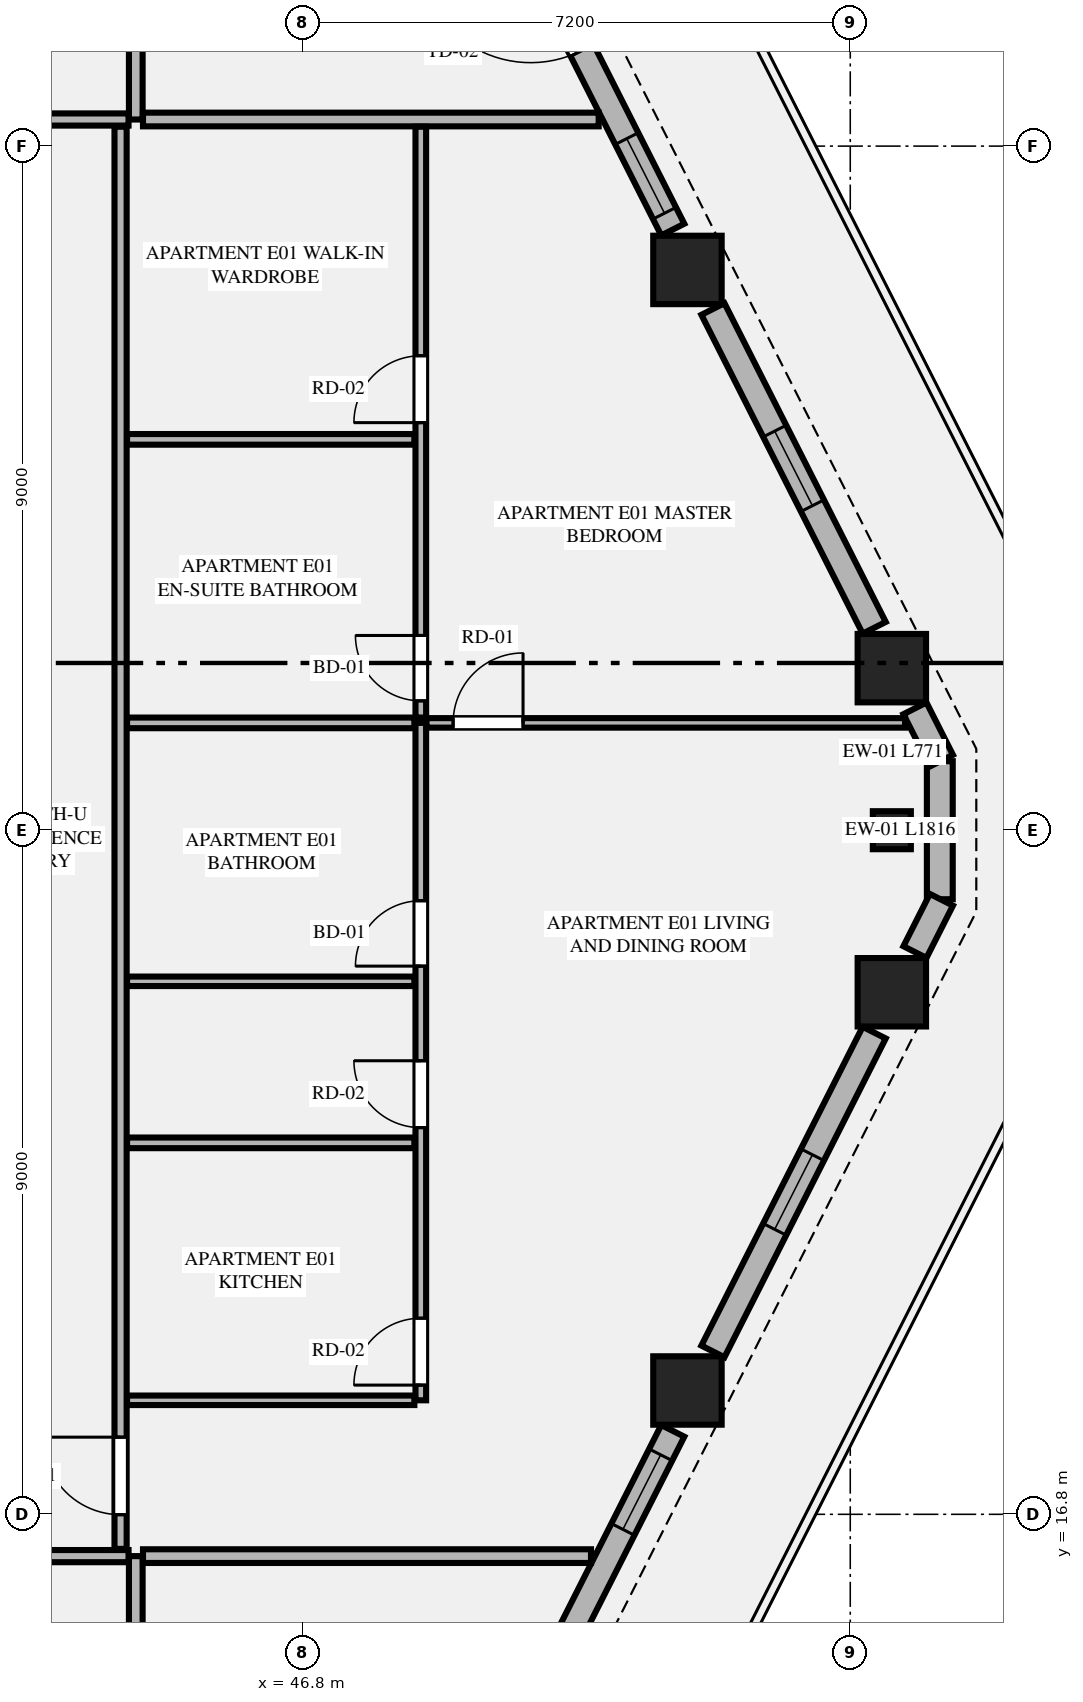
"""IFC4 building model, lengths in metres.
Left out: names, types, materials, properties, quantities, classifications, styles, units other than length and angle.
Written with IfcOpenShell. Run it as: python <this file> out.ifc"""

import sys

from ifc_helpers import new_model, si_unit, direction, frame, frame_2d, origin, origin_2d, place, context, subcontext, project, spatial, rectangle, extrude, element, fill, save


model = new_model("IFC4")
c1 = context("Model", 3, precision=1e-05, world=origin(), true_north=direction((0.0, 1.0)))
c2 = subcontext(c1, "Body", "Model", "MODEL_VIEW")
j1 = project(units=[si_unit("LENGTHUNIT", "METRE"), si_unit("PLANEANGLEUNIT", "RADIAN")], contexts=[c1])
p1 = place(None, origin())
s1 = spatial("IfcSite", under=j1, at=p1, CompositionType="ELEMENT")
p2 = place(p1, origin())
s2 = spatial("IfcBuilding", under=s1, at=p2, CompositionType="ELEMENT")
p3 = place(p2, frame((0.0, 0.0, 171.9)))
s3 = spatial("IfcBuildingStorey", under=s2, at=p3, CompositionType="ELEMENT", Elevation=171.9)
for number, where, z_axis, x_axis in (
    (1, (51.858, 18.429, 0.0), (0.0, 0.0, 1.0), (1.0, 0.0, 0.0)),
    (2, (54.547, 23.668, 0.0), (0.0, 0.0, 1.0), (1.0, 0.0, 0.0)),
    (3, (54.547, 27.932, 0.0), (0.0, 0.0, 1.0), (1.0, 0.0, 0.0)),
    (4, (51.858, 33.171, 0.0), (0.0, 0.0, 1.0), (1.0, 0.0, 0.0)),
):
    element("IfcColumn", number, at=place(p3, frame(where, z_axis=z_axis, x_axis=x_axis)), inside=s3, PredefinedType="COLUMN", context=c2, shape_type="SweptSolid", body=[
        extrude(rectangle(XDim=0.9, YDim=0.9, at=origin_2d()), origin(), (0.0, 0.0, 1.0), 3.55),
    ])
p4 = place(p3, frame((54.547, 25.8, 0.0), z_axis=(0.0, 0.0, 1.0), x_axis=(0.0, 1.0, 0.0)))
e5 = element("IfcColumn", 5, at=p4, inside=s3, PredefinedType="PILASTER", context=c2, shape_type="SweptSolid", body=[
    extrude(rectangle(XDim=0.5, YDim=0.35, at=origin_2d()), origin(), (0.0, 0.0, 1.0), 3.55),
])
p5 = place(p3, frame((55.178, 24.892, 0.0), z_axis=(0.0, 0.0, 1.0), x_axis=(0.0, 1.0, 0.0)))
e6 = element("IfcWall", 6, at=p5, inside=s3, PredefinedType="STANDARD", context=c2, shape_type="SweptSolid", body=[
    extrude(rectangle(XDim=1.816, YDim=0.34, at=frame_2d((0.908, 0.0))), origin(), (0.0, 0.0, 1.0), 3.35),
])
p6 = place(p3, frame((49.448, 13.517, 0.0), z_axis=(0.0, 0.0, 1.0), x_axis=(0.451544279509, 0.892248711763, 0.0)))
e7 = element("IfcWall", 7, at=p6, inside=s3, PredefinedType="STANDARD", context=c2, shape_type="SweptSolid", body=[
    extrude(rectangle(XDim=4.91, YDim=0.34, at=frame_2d((2.455, 0.0))), origin(), (0.0, 0.0, 1.0), 2.883),
])
p7 = place(p6, frame((0.851, 0.0, 0.75)))
e8 = element("IfcOpeningElement", 8, at=p7, cuts=e7, PredefinedType="OPENING", context=c2, shape_type="SweptSolid", body=[
    extrude(rectangle(XDim=1.1, YDim=1.983, at=frame_2d((0.55, 0.991))), frame((0.0, 0.18, 0.0), z_axis=(0.0, -1.0, 0.0), x_axis=(1.0, 0.0, 0.0)), (0.0, 0.0, 1.0), 0.36),
])
p8 = place(p6, frame((3.457, 0.0, 0.75)))
e9 = element("IfcOpeningElement", 9, at=p8, cuts=e7, PredefinedType="OPENING", context=c2, shape_type="SweptSolid", body=[
    extrude(rectangle(XDim=1.1, YDim=1.983, at=frame_2d((0.55, 0.991))), frame((0.0, 0.18, 0.0), z_axis=(0.0, -1.0, 0.0), x_axis=(1.0, 0.0, 0.0)), (0.0, 0.0, 1.0), 0.36),
])
p9 = place(p3, frame((52.193, 18.943, 0.0), z_axis=(0.0, 0.0, 1.0), x_axis=(0.451447222193, 0.892297823361, 0.0)))
e10 = element("IfcWall", 10, at=p9, inside=s3, PredefinedType="STANDARD", context=c2, shape_type="SweptSolid", body=[
    extrude(rectangle(XDim=4.7, YDim=0.34, at=frame_2d((2.35, 0.0))), origin(), (0.0, 0.0, 1.0), 2.883),
])
p10 = place(p9, frame((1.8, 0.0, 0.75)))
e11 = element("IfcOpeningElement", 11, at=p10, cuts=e10, PredefinedType="OPENING", context=c2, shape_type="SweptSolid", body=[
    extrude(rectangle(XDim=1.1, YDim=1.983, at=frame_2d((0.55, 0.991))), frame((0.0, 0.18, 0.0), z_axis=(0.0, -1.0, 0.0), x_axis=(1.0, 0.0, 0.0)), (0.0, 0.0, 1.0), 0.36),
])
for number, where, z_axis, x_axis in (
    (12, (54.851, 24.197, 0.0), (0.0, 0.0, 1.0), (0.451, 0.892, 0.0)),
    (13, (55.199, 26.715, 0.0), (0.0, 0.0, 1.0), (-0.451, 0.892, 0.0)),
):
    element("IfcWall", number, at=place(p3, frame(where, z_axis=z_axis, x_axis=x_axis)), inside=s3, PredefinedType="STANDARD", context=c2, shape_type="SweptSolid", body=[
        extrude(rectangle(XDim=0.771, YDim=0.34, at=frame_2d((0.385, 0.0))), origin(), (0.0, 0.0, 1.0), 3.35),
    ])
p11 = place(p3, frame((54.315, 28.463, 0.0), z_axis=(0.0, 0.0, 1.0), x_axis=(-0.451426298588, 0.892308409096, 0.0)))
e14 = element("IfcWall", 14, at=p11, inside=s3, PredefinedType="STANDARD", context=c2, shape_type="SweptSolid", body=[
    extrude(rectangle(XDim=4.7, YDim=0.34, at=frame_2d((2.35, 0.0))), origin(), (0.0, 0.0, 1.0), 2.883),
])
p12 = place(p11, frame((1.8, 0.0, 0.75)))
e15 = element("IfcOpeningElement", 15, at=p12, cuts=e14, PredefinedType="OPENING", context=c2, shape_type="SweptSolid", body=[
    extrude(rectangle(XDim=1.1, YDim=1.983, at=frame_2d((0.55, 0.991))), frame((0.0, 0.18, 0.0), z_axis=(0.0, -1.0, 0.0), x_axis=(1.0, 0.0, 0.0)), (0.0, 0.0, 1.0), 0.36),
])
p13 = place(p3, frame((51.665, 33.702, 0.0), z_axis=(0.0, 0.0, 1.0), x_axis=(-0.451524246964, 0.89225884944, 0.0)))
e16 = element("IfcWall", 16, at=p13, inside=s3, PredefinedType="STANDARD", context=c2, shape_type="SweptSolid", body=[
    extrude(rectangle(XDim=4.91, YDim=0.34, at=frame_2d((2.455, 0.0))), origin(), (0.0, 0.0, 1.0), 2.883),
])
p14 = place(p13, frame((2.642, 0.0, 0.0)))
e17 = element("IfcOpeningElement", 17, at=p14, cuts=e16, PredefinedType="OPENING", context=c2, shape_type="SweptSolid", body=[
    extrude(rectangle(XDim=1.5, YDim=2.3, at=frame_2d((0.75, 1.15))), frame((0.0, 0.18, 0.0), z_axis=(0.0, -1.0, 0.0), x_axis=(1.0, 0.0, 0.0)), (0.0, 0.0, 1.0), 0.36),
])
p15 = place(p13, frame((0.241, 0.0, 0.75)))
e18 = element("IfcOpeningElement", 18, at=p15, cuts=e16, PredefinedType="OPENING", context=c2, shape_type="SweptSolid", body=[
    extrude(rectangle(XDim=1.1, YDim=1.983, at=frame_2d((0.55, 0.991))), frame((0.0, 0.18, 0.0), z_axis=(0.0, -1.0, 0.0), x_axis=(1.0, 0.0, 0.0)), (0.0, 0.0, 1.0), 0.36),
])
p16 = place(p3, frame((44.6, 5.968, 0.0), z_axis=(0.0, 0.0, 1.0), x_axis=(0.0, 1.0, 0.0)))
e19 = element("IfcWall", 19, at=p16, inside=s3, PredefinedType="PARTITIONING", context=c2, shape_type="SweptSolid", body=[
    extrude(rectangle(XDim=10.282, YDim=0.18, at=frame_2d((5.141, 0.0))), origin(), (0.0, 0.0, 1.0), 3.35),
])
p17 = place(p3, frame((36.038, 16.25, 0.0), z_axis=(0.0, 0.0, 1.0), x_axis=(1.0, 0.0, 0.0)))
e20 = element("IfcWall", 20, at=p17, inside=s3, PredefinedType="PARTITIONING", context=c2, shape_type="SweptSolid", body=[
    extrude(rectangle(XDim=8.467, YDim=0.16, at=frame_2d((4.233, 0.0))), origin(), (0.0, 0.0, 1.0), 3.35),
])
p18 = place(p17, frame((0.355, 0.0, 0.0)))
e21 = element("IfcOpeningElement", 21, at=p18, cuts=e20, PredefinedType="OPENING", context=c2, shape_type="SweptSolid", body=[
    extrude(rectangle(XDim=1.02, YDim=2.25, at=frame_2d((0.51, 1.125))), frame((0.0, 0.09, 0.0), z_axis=(0.0, -1.0, 0.0), x_axis=(1.0, 0.0, 0.0)), (0.0, 0.0, 1.0), 0.18),
])
p19 = place(p3, frame((44.6, 35.15, 0.0), z_axis=(0.0, 0.0, 1.0), x_axis=(0.0, 1.0, 0.0)))
e22 = element("IfcWall", 22, at=p19, inside=s3, PredefinedType="PARTITIONING", context=c2, shape_type="SweptSolid", body=[
    extrude(rectangle(XDim=10.482, YDim=0.18, at=frame_2d((5.241, 0.0))), origin(), (0.0, 0.0, 1.0), 3.35),
])
p20 = place(p3, frame((36.038, 35.15, 0.0), z_axis=(0.0, 0.0, 1.0), x_axis=(1.0, 0.0, 0.0)))
e23 = element("IfcWall", 23, at=p20, inside=s3, PredefinedType="PARTITIONING", context=c2, shape_type="SweptSolid", body=[
    extrude(rectangle(XDim=8.467, YDim=0.16, at=frame_2d((4.233, 0.0))), origin(), (0.0, 0.0, 1.0), 3.35),
])
p21 = place(p20, frame((6.212, 0.0, 0.0)))
e24 = element("IfcOpeningElement", 24, at=p21, cuts=e23, PredefinedType="OPENING", context=c2, shape_type="SweptSolid", body=[
    extrude(rectangle(XDim=1.02, YDim=2.25, at=frame_2d((0.51, 1.125))), frame((0.0, 0.09, 0.0), z_axis=(0.0, -1.0, 0.0), x_axis=(1.0, 0.0, 0.0)), (0.0, 0.0, 1.0), 0.18),
])
p22 = place(p3, frame((44.695, 16.25, 0.0), z_axis=(0.0, 0.0, 1.0), x_axis=(1.0, 0.0, 0.0)))
e25 = element("IfcWall", 25, at=p22, inside=s3, PredefinedType="PARTITIONING", context=c2, shape_type="SweptSolid", body=[
    extrude(rectangle(XDim=5.894, YDim=0.18, at=frame_2d((2.947, 0.0))), origin(), (0.0, 0.0, 1.0), 3.35),
])
p23 = place(p3, frame((44.695, 35.15, 0.0), z_axis=(0.0, 0.0, 1.0), x_axis=(1.0, 0.0, 0.0)))
e26 = element("IfcWall", 26, at=p23, inside=s3, PredefinedType="PARTITIONING", context=c2, shape_type="SweptSolid", body=[
    extrude(rectangle(XDim=5.995, YDim=0.18, at=frame_2d((2.998, 0.0))), origin(), (0.0, 0.0, 1.0), 3.35),
])
p24 = place(p3, frame((44.4, 16.345, 0.0), z_axis=(0.0, 0.0, 1.0), x_axis=(0.0, 1.0, 0.0)))
e27 = element("IfcWall", 27, at=p24, inside=s3, PredefinedType="PARTITIONING", context=c2, shape_type="SweptSolid", body=[
    extrude(rectangle(XDim=18.71, YDim=0.16, at=frame_2d((9.355, 0.0))), origin(), (0.0, 0.0, 1.0), 3.35),
])
p25 = place(p24, frame((0.45, 0.0, 0.0)))
e28 = element("IfcOpeningElement", 28, at=p25, cuts=e27, PredefinedType="OPENING", context=c2, shape_type="SweptSolid", body=[
    extrude(rectangle(XDim=1.02, YDim=2.25, at=frame_2d((0.51, 1.125))), frame((0.0, 0.09, 0.0), z_axis=(0.0, -1.0, 0.0), x_axis=(1.0, 0.0, 0.0)), (0.0, 0.0, 1.0), 0.18),
])
p26 = place(p3, frame((44.485, 18.3, 0.0), z_axis=(0.0, 0.0, 1.0), x_axis=(1.0, 0.0, 0.0)))
e29 = element("IfcWall", 29, at=p26, inside=s3, PredefinedType="PARTITIONING", context=c2, shape_type="SweptSolid", body=[
    extrude(rectangle(XDim=3.78, YDim=0.125, at=frame_2d((1.89, 0.0))), origin(), (0.0, 0.0, 1.0), 2.807),
])
p27 = place(p3, frame((48.35, 18.3, 0.0), z_axis=(0.0, 0.0, 1.0), x_axis=(0.0, 1.0, 0.0)))
e30 = element("IfcWall", 30, at=p27, inside=s3, PredefinedType="PLUMBINGWALL", context=c2, shape_type="SweptSolid", body=[
    extrude(rectangle(XDim=8.912, YDim=0.14, at=frame_2d((4.456, 0.0))), origin(), (0.0, 0.0, 1.0), 3.35),
])
p28 = place(p27, frame((0.2, 0.0, 0.0)))
e31 = element("IfcOpeningElement", 31, at=p28, cuts=e30, PredefinedType="OPENING", context=c2, shape_type="SweptSolid", body=[
    extrude(rectangle(XDim=0.88, YDim=2.15, at=frame_2d((0.44, 1.075))), frame((0.0, 0.08, 0.0), z_axis=(0.0, -1.0, 0.0), x_axis=(1.0, 0.0, 0.0)), (0.0, 0.0, 1.0), 0.16),
])
p29 = place(p27, frame((3.587, 0.0, 0.0)))
e32 = element("IfcOpeningElement", 32, at=p29, cuts=e30, PredefinedType="OPENING", context=c2, shape_type="SweptSolid", body=[
    extrude(rectangle(XDim=0.88, YDim=2.15, at=frame_2d((0.44, 1.075))), frame((0.0, 0.08, 0.0), z_axis=(0.0, -1.0, 0.0), x_axis=(1.0, 0.0, 0.0)), (0.0, 0.0, 1.0), 0.16),
])
p30 = place(p27, frame((5.712, 0.0, 0.0)))
e33 = element("IfcOpeningElement", 33, at=p30, cuts=e30, PredefinedType="OPENING", context=c2, shape_type="SweptSolid", body=[
    extrude(rectangle(XDim=0.86, YDim=2.1, at=frame_2d((0.43, 1.05))), frame((0.0, 0.08, 0.0), z_axis=(0.0, -1.0, 0.0), x_axis=(1.0, 0.0, 0.0)), (0.0, 0.0, 1.0), 0.16),
])
p31 = place(p3, frame((48.35, 27.282, 0.0), z_axis=(0.0, 0.0, 1.0), x_axis=(0.0, 1.0, 0.0)))
e34 = element("IfcWall", 34, at=p31, inside=s3, PredefinedType="PLUMBINGWALL", context=c2, shape_type="SweptSolid", body=[
    extrude(rectangle(XDim=7.773, YDim=0.14, at=frame_2d((3.886, 0.0))), origin(), (0.0, 0.0, 1.0), 3.35),
])
p32 = place(p31, frame((0.22, 0.0, 0.0)))
e35 = element("IfcOpeningElement", 35, at=p32, cuts=e34, PredefinedType="OPENING", context=c2, shape_type="SweptSolid", body=[
    extrude(rectangle(XDim=0.86, YDim=2.1, at=frame_2d((0.43, 1.05))), frame((0.0, 0.08, 0.0), z_axis=(0.0, -1.0, 0.0), x_axis=(1.0, 0.0, 0.0)), (0.0, 0.0, 1.0), 0.16),
])
p33 = place(p31, frame((3.88, 0.0, 0.0)))
e36 = element("IfcOpeningElement", 36, at=p33, cuts=e34, PredefinedType="OPENING", context=c2, shape_type="SweptSolid", body=[
    extrude(rectangle(XDim=0.88, YDim=2.15, at=frame_2d((0.44, 1.075))), frame((0.0, 0.08, 0.0), z_axis=(0.0, -1.0, 0.0), x_axis=(1.0, 0.0, 0.0)), (0.0, 0.0, 1.0), 0.16),
])
p34 = place(p3, frame((44.485, 27.212, 0.0), z_axis=(0.0, 0.0, 1.0), x_axis=(1.0, 0.0, 0.0)))
e37 = element("IfcWall", 37, at=p34, inside=s3, PredefinedType="PLUMBINGWALL", context=c2, shape_type="SweptSolid", body=[
    extrude(rectangle(XDim=3.78, YDim=0.14, at=frame_2d((1.89, 0.0))), origin(), (0.0, 0.0, 1.0), 3.35),
])
p35 = place(p3, frame((48.425, 27.212, 0.0), z_axis=(0.0, 0.0, 1.0), x_axis=(1.0, 0.0, 0.0)))
e38 = element("IfcWall", 38, at=p35, inside=s3, PredefinedType="PARTITIONING", context=c2, shape_type="SweptSolid", body=[
    extrude(rectangle(XDim=6.296, YDim=0.125, at=frame_2d((3.148, 0.0))), origin(), (0.0, 0.0, 1.0), 3.35),
])
p36 = place(p35, frame((0.35, 0.0, 0.0)))
e39 = element("IfcOpeningElement", 39, at=p36, cuts=e38, PredefinedType="OPENING", context=c2, shape_type="SweptSolid", body=[
    extrude(rectangle(XDim=0.92, YDim=2.15, at=frame_2d((0.46, 1.075))), frame((0.0, 0.073, 0.0), z_axis=(0.0, -1.0, 0.0), x_axis=(1.0, 0.0, 0.0)), (0.0, 0.0, 1.0), 0.145),
])
p37 = place(p3, frame((44.485, 21.687, 0.0), z_axis=(0.0, 0.0, 1.0), x_axis=(1.0, 0.0, 0.0)))
e40 = element("IfcWall", 40, at=p37, inside=s3, PredefinedType="PLUMBINGWALL", context=c2, shape_type="SweptSolid", body=[
    extrude(rectangle(XDim=3.78, YDim=0.14, at=frame_2d((1.89, 0.0))), origin(), (0.0, 0.0, 1.0), 3.35),
])
p38 = place(p3, frame((44.485, 23.812, 0.0), z_axis=(0.0, 0.0, 1.0), x_axis=(1.0, 0.0, 0.0)))
e41 = element("IfcWall", 41, at=p38, inside=s3, PredefinedType="PARTITIONING", context=c2, shape_type="SweptSolid", body=[
    extrude(rectangle(XDim=3.78, YDim=0.125, at=frame_2d((1.89, 0.0))), origin(), (0.0, 0.0, 1.0), 3.35),
])
p39 = place(p3, frame((44.485, 30.942, 0.0), z_axis=(0.0, 0.0, 1.0), x_axis=(1.0, 0.0, 0.0)))
e42 = element("IfcWall", 42, at=p39, inside=s3, PredefinedType="PLUMBINGWALL", context=c2, shape_type="SweptSolid", body=[
    extrude(rectangle(XDim=3.78, YDim=0.14, at=frame_2d((1.89, 0.0))), origin(), (0.0, 0.0, 1.0), 3.35),
])
p40 = place(p10, origin())
e43 = element("IfcWindow", 43, at=p40, inside=s3, PartitioningType="SINGLE_PANEL", PredefinedType="WINDOW", context=c2, shape_type="SweptSolid", body=[
    extrude(rectangle(XDim=1.1, YDim=1.983, at=frame_2d((0.55, 0.991))), frame((0.0, 0.03, 0.0), z_axis=(0.0, -1.0, 0.0), x_axis=(1.0, 0.0, 0.0)), (0.0, 0.0, 1.0), 0.06),
])
fill(e11, e43)
p41 = place(p12, origin())
e44 = element("IfcWindow", 44, at=p41, inside=s3, PartitioningType="SINGLE_PANEL", PredefinedType="WINDOW", context=c2, shape_type="SweptSolid", body=[
    extrude(rectangle(XDim=1.1, YDim=1.983, at=frame_2d((0.55, 0.991))), frame((0.0, 0.03, 0.0), z_axis=(0.0, -1.0, 0.0), x_axis=(1.0, 0.0, 0.0)), (0.0, 0.0, 1.0), 0.06),
])
fill(e15, e44)
p42 = place(p28, origin())
e45 = element("IfcDoor", 45, at=p42, inside=s3, OperationType="SINGLE_SWING_LEFT", PredefinedType="DOOR", context=c2, shape_type="SweptSolid", body=[
    extrude(rectangle(XDim=0.88, YDim=2.15, at=frame_2d((0.44, 1.075))), frame((0.0, 0.025, 0.0), z_axis=(0.0, -1.0, 0.0), x_axis=(1.0, 0.0, 0.0)), (0.0, 0.0, 1.0), 0.05),
])
fill(e31, e45)
p43 = place(p29, origin())
e46 = element("IfcDoor", 46, at=p43, inside=s3, OperationType="SINGLE_SWING_RIGHT", PredefinedType="DOOR", context=c2, shape_type="SweptSolid", body=[
    extrude(rectangle(XDim=0.88, YDim=2.15, at=frame_2d((0.44, 1.075))), frame((0.0, 0.025, 0.0), z_axis=(0.0, -1.0, 0.0), x_axis=(1.0, 0.0, 0.0)), (0.0, 0.0, 1.0), 0.05),
])
fill(e32, e46)
p44 = place(p30, origin())
e47 = element("IfcDoor", 47, at=p44, inside=s3, OperationType="SINGLE_SWING_LEFT", PredefinedType="DOOR", context=c2, shape_type="SweptSolid", body=[
    extrude(rectangle(XDim=0.86, YDim=2.1, at=frame_2d((0.43, 1.05))), frame((0.0, 0.025, 0.0), z_axis=(0.0, -1.0, 0.0), x_axis=(1.0, 0.0, 0.0)), (0.0, 0.0, 1.0), 0.05),
])
fill(e33, e47)
p45 = place(p32, origin())
e48 = element("IfcDoor", 48, at=p45, inside=s3, OperationType="SINGLE_SWING_RIGHT", PredefinedType="DOOR", context=c2, shape_type="SweptSolid", body=[
    extrude(rectangle(XDim=0.86, YDim=2.1, at=frame_2d((0.43, 1.05))), frame((0.0, 0.025, 0.0), z_axis=(0.0, -1.0, 0.0), x_axis=(1.0, 0.0, 0.0)), (0.0, 0.0, 1.0), 0.05),
])
fill(e35, e48)
p46 = place(p33, origin())
e49 = element("IfcDoor", 49, at=p46, inside=s3, OperationType="SINGLE_SWING_LEFT", PredefinedType="DOOR", context=c2, shape_type="SweptSolid", body=[
    extrude(rectangle(XDim=0.88, YDim=2.15, at=frame_2d((0.44, 1.075))), frame((0.0, 0.025, 0.0), z_axis=(0.0, -1.0, 0.0), x_axis=(1.0, 0.0, 0.0)), (0.0, 0.0, 1.0), 0.05),
])
fill(e36, e49)
p47 = place(p25, origin())
e50 = element("IfcDoor", 50, at=p47, inside=s3, OperationType="SINGLE_SWING_RIGHT", PredefinedType="DOOR", context=c2, shape_type="SweptSolid", body=[
    extrude(rectangle(XDim=1.02, YDim=2.25, at=frame_2d((0.51, 1.125))), frame((0.0, 0.025, 0.0), z_axis=(0.0, -1.0, 0.0), x_axis=(1.0, 0.0, 0.0)), (0.0, 0.0, 1.0), 0.05),
])
fill(e28, e50)
p48 = place(p36, origin())
e51 = element("IfcDoor", 51, at=p48, inside=s3, OperationType="SINGLE_SWING_RIGHT", PredefinedType="DOOR", context=c2, shape_type="SweptSolid", body=[
    extrude(rectangle(XDim=0.92, YDim=2.15, at=frame_2d((0.46, 1.075))), frame((0.0, 0.025, 0.0), z_axis=(0.0, -1.0, 0.0), x_axis=(1.0, 0.0, 0.0)), (0.0, 0.0, 1.0), 0.05),
])
fill(e39, e51)
p49 = place(p8, origin())
e52 = element("IfcWindow", 52, at=p49, inside=s3, PartitioningType="SINGLE_PANEL", PredefinedType="WINDOW", context=c2, shape_type="SweptSolid", body=[
    extrude(rectangle(XDim=1.1, YDim=1.983, at=frame_2d((0.55, 0.991))), frame((0.0, 0.03, 0.0), z_axis=(0.0, -1.0, 0.0), x_axis=(1.0, 0.0, 0.0)), (0.0, 0.0, 1.0), 0.06),
])
fill(e9, e52)
p50 = place(p15, origin())
e53 = element("IfcWindow", 53, at=p50, inside=s3, PartitioningType="SINGLE_PANEL", PredefinedType="WINDOW", context=c2, shape_type="SweptSolid", body=[
    extrude(rectangle(XDim=1.1, YDim=1.983, at=frame_2d((0.55, 0.991))), frame((0.0, 0.03, 0.0), z_axis=(0.0, -1.0, 0.0), x_axis=(1.0, 0.0, 0.0)), (0.0, 0.0, 1.0), 0.06),
])
fill(e18, e53)
save(model, sys.argv[1])
